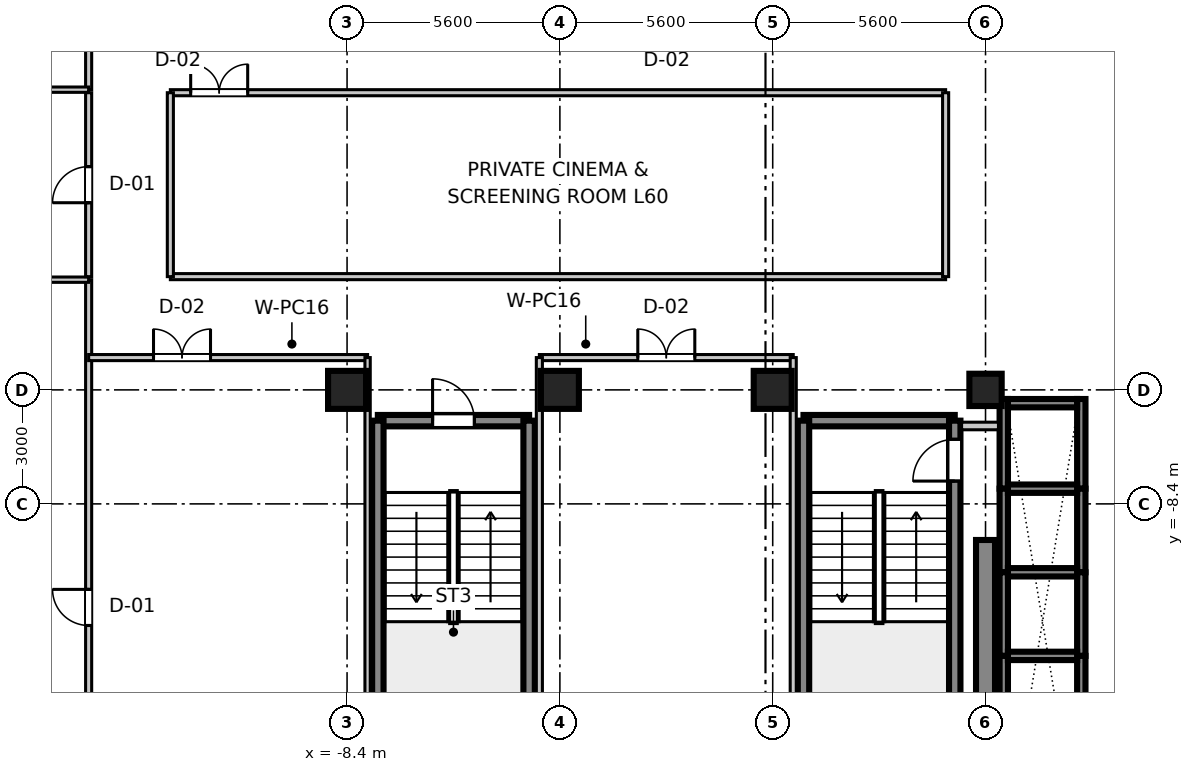
"""IFC4 building model, lengths in metres.
Left out: names, types, materials, properties, quantities, classifications, styles, units other than length and angle.
Written with IfcOpenShell. Run it as: python <this file> out.ifc"""

import sys

from ifc_helpers import new_model, si_unit, direction, frame, frame_2d, origin, origin_2d, place, context, subcontext, project, spatial, rectangle, extrude, source, transform, mapped, element, fill, save


model = new_model("IFC4")
c1 = context("Model", 3, precision=1e-05, world=origin(), true_north=direction((0.0, 1.0)))
c2 = subcontext(c1, "Body", "Model", "MODEL_VIEW")
j1 = project(units=[si_unit("LENGTHUNIT", "METRE"), si_unit("PLANEANGLEUNIT", "RADIAN")], contexts=[c1])
p1 = place(None, origin())
s1 = spatial("IfcSite", under=j1, at=p1, CompositionType="ELEMENT")
p2 = place(p1, origin())
s2 = spatial("IfcBuilding", under=s1, at=p2, CompositionType="ELEMENT")
p3 = place(p2, frame((0.0, 0.0, 234.5)))
s3 = spatial("IfcBuildingStorey", under=s2, at=p3, CompositionType="ELEMENT", Elevation=234.5)
m1 = source(origin(), c2, "Body", "SweptSolid", [
    extrude(rectangle(XDim=1.0, YDim=1.0, at=origin_2d()), origin(), (0.0, 0.0, 1.0), 3.655),
])
for number, where, z_axis, x_axis in (
    (1, (-8.4, -5.4, 0.0), (0.0, 0.0, 1.0), (1.0, 0.0, 0.0)),
    (2, (-2.8, -5.4, 0.0), (0.0, 0.0, 1.0), (1.0, 0.0, 0.0)),
    (3, (2.8, -5.4, 0.0), (0.0, 0.0, 1.0), (1.0, 0.0, 0.0)),
):
    element("IfcColumn", number, at=place(p3, frame(where, z_axis=z_axis, x_axis=x_axis)), inside=s3, PredefinedType="COLUMN", context=c2, shape_type="MappedRepresentation", body=[
        mapped(m1, transform((0.0, 0.0, 0.0), scale=1.0)),
    ])
m2 = source(origin(), c2, "Body", "SweptSolid", [
    extrude(rectangle(XDim=0.85, YDim=0.85, at=origin_2d()), origin(), (0.0, 0.0, 1.0), 3.655),
])
p4 = place(p3, frame((8.4, -5.4, 0.0), z_axis=(0.0, 0.0, 1.0), x_axis=(1.0, 0.0, 0.0)))
e4 = element("IfcColumn", 4, at=p4, inside=s3, PredefinedType="PILASTER", context=c2, shape_type="MappedRepresentation", body=[
    mapped(m2, transform((0.0, 0.0, 0.0), scale=1.0)),
])
m3 = source(origin(), c2, "Body", "SweptSolid", [
    extrude(rectangle(XDim=7.65, YDim=0.5, at=frame_2d((3.825, 0.0))), origin(), (0.0, 0.0, 1.0), 3.41),
])
p5 = place(p3, frame((8.4, -17.0, 0.0), z_axis=(0.0, 0.0, 1.0), x_axis=(0.0, 1.0, 0.0)))
e5 = element("IfcWall", 5, at=p5, inside=s3, PredefinedType="SHEAR", context=c2, shape_type="MappedRepresentation", body=[
    mapped(m3, transform((0.0, 0.0, 0.0), scale=1.0)),
])
m4 = source(origin(), c2, "Body", "SweptSolid", [
    extrude(rectangle(XDim=3.98, YDim=0.3, at=frame_2d((1.99, 0.0))), origin(), (0.0, 0.0, 1.0), 3.41),
])
p6 = place(p3, frame((3.61, -6.21, 0.0), z_axis=(0.0, 0.0, 1.0), x_axis=(1.0, 0.0, 0.0)))
e6 = element("IfcWall", 6, at=p6, inside=s3, PredefinedType="SHEAR", context=c2, shape_type="MappedRepresentation", body=[
    mapped(m4, transform((0.0, 0.0, 0.0), scale=1.0)),
])
m5 = source(origin(), c2, "Body", "SweptSolid", [
    extrude(rectangle(XDim=9.38, YDim=0.3, at=frame_2d((4.69, 0.0))), origin(), (0.0, 0.0, 1.0), 3.41),
])
p7 = place(p3, frame((3.61, -15.59, 0.0), z_axis=(0.0, 0.0, 1.0), x_axis=(0.0, 1.0, 0.0)))
e7 = element("IfcWall", 7, at=p7, inside=s3, PredefinedType="SHEAR", context=c2, shape_type="MappedRepresentation", body=[
    mapped(m5, transform((0.0, 0.0, 0.0), scale=1.0)),
])
p8 = place(p3, frame((7.59, -15.59, 0.0), z_axis=(0.0, 0.0, 1.0), x_axis=(0.0, 1.0, 0.0)))
e8 = element("IfcWall", 8, at=p8, inside=s3, PredefinedType="SHEAR", context=c2, shape_type="MappedRepresentation", body=[
    mapped(m5, transform((0.0, 0.0, 0.0), scale=1.0)),
])
p9 = place(p8, frame((7.79, 0.0, 0.0)))
e9 = element("IfcOpeningElement", 9, at=p9, cuts=e8, PredefinedType="OPENING", context=c2, shape_type="SweptSolid", body=[
    extrude(rectangle(XDim=1.1, YDim=2.15, at=frame_2d((0.55, 1.075))), frame((0.0, 0.16, 0.0), z_axis=(0.0, -1.0, 0.0), x_axis=(1.0, 0.0, 0.0)), (0.0, 0.0, 1.0), 0.32),
])
p10 = place(p3, frame((-7.59, -6.21, 0.0), z_axis=(0.0, 0.0, 1.0), x_axis=(1.0, 0.0, 0.0)))
e10 = element("IfcWall", 10, at=p10, inside=s3, PredefinedType="SHEAR", context=c2, shape_type="MappedRepresentation", body=[
    mapped(m4, transform((0.0, 0.0, 0.0), scale=1.0)),
])
p11 = place(p10, frame((1.44, 0.0, 0.0)))
e11 = element("IfcOpeningElement", 11, at=p11, cuts=e10, PredefinedType="OPENING", context=c2, shape_type="SweptSolid", body=[
    extrude(rectangle(XDim=1.1, YDim=2.15, at=frame_2d((0.55, 1.075))), frame((0.0, 0.16, 0.0), z_axis=(0.0, -1.0, 0.0), x_axis=(1.0, 0.0, 0.0)), (0.0, 0.0, 1.0), 0.32),
])
for number, where, z_axis, x_axis in (
    (12, (-7.59, -15.59, 0.0), (0.0, 0.0, 1.0), (0.0, 1.0, 0.0)),
    (13, (-3.61, -15.59, 0.0), (0.0, 0.0, 1.0), (0.0, 1.0, 0.0)),
):
    element("IfcWall", number, at=place(p3, frame(where, z_axis=z_axis, x_axis=x_axis)), inside=s3, PredefinedType="SHEAR", context=c2, shape_type="MappedRepresentation", body=[
        mapped(m5, transform((0.0, 0.0, 0.0), scale=1.0)),
    ])
m6 = source(origin(), c2, "Body", "SweptSolid", [
    extrude(rectangle(XDim=2.36, YDim=0.22, at=frame_2d((1.18, 0.0))), origin(), (0.0, 0.0, 1.0), 3.41),
])
for number, where, z_axis, x_axis in (
    (14, (8.88, -8.0, 0.0), (0.0, 0.0, 1.0), (0.0, 1.0, 0.0)),
    (15, (10.92, -8.0, 0.0), (0.0, 0.0, 1.0), (0.0, 1.0, 0.0)),
):
    element("IfcWall", number, at=place(p3, frame(where, z_axis=z_axis, x_axis=x_axis)), inside=s3, PredefinedType="SHEAR", context=c2, shape_type="MappedRepresentation", body=[
        mapped(m6, transform((0.0, 0.0, 0.0), scale=1.0)),
    ])
m7 = source(origin(), c2, "Body", "SweptSolid", [
    extrude(rectangle(XDim=1.82, YDim=0.22, at=frame_2d((0.91, 0.0))), origin(), (0.0, 0.0, 1.0), 3.41),
])
p12 = place(p3, frame((8.99, -5.75, 0.0), z_axis=(0.0, 0.0, 1.0), x_axis=(1.0, 0.0, 0.0)))
e16 = element("IfcWall", 16, at=p12, inside=s3, PredefinedType="SHEAR", context=c2, shape_type="MappedRepresentation", body=[
    mapped(m7, transform((0.0, 0.0, 0.0), scale=1.0)),
])
m8 = source(origin(), c2, "Body", "SweptSolid", [
    extrude(rectangle(XDim=2.2, YDim=0.22, at=frame_2d((1.1, 0.0))), origin(), (0.0, 0.0, 1.0), 3.41),
])
for number, where, z_axis, x_axis in (
    (17, (8.88, -10.2, 0.0), (0.0, 0.0, 1.0), (0.0, 1.0, 0.0)),
    (18, (10.92, -10.2, 0.0), (0.0, 0.0, 1.0), (0.0, 1.0, 0.0)),
):
    element("IfcWall", number, at=place(p3, frame(where, z_axis=z_axis, x_axis=x_axis)), inside=s3, PredefinedType="SHEAR", context=c2, shape_type="MappedRepresentation", body=[
        mapped(m8, transform((0.0, 0.0, 0.0), scale=1.0)),
    ])
m9 = source(origin(), c2, "Body", "SweptSolid", [
    extrude(rectangle(XDim=1.82, YDim=0.22, at=frame_2d((0.91, 0.0))), origin(), (0.0, 0.0, 1.0), 3.7),
])
p13 = place(p3, frame((8.99, -8.0, 0.0), z_axis=(0.0, 0.0, 1.0), x_axis=(1.0, 0.0, 0.0)))
e19 = element("IfcWall", 19, at=p13, inside=s3, PredefinedType="SHEAR", context=c2, shape_type="MappedRepresentation", body=[
    mapped(m9, transform((0.0, 0.0, 0.0), scale=1.0)),
])
for number, where, z_axis, x_axis in (
    (20, (8.88, -12.4, 0.0), (0.0, 0.0, 1.0), (0.0, 1.0, 0.0)),
    (21, (10.92, -12.4, 0.0), (0.0, 0.0, 1.0), (0.0, 1.0, 0.0)),
):
    element("IfcWall", number, at=place(p3, frame(where, z_axis=z_axis, x_axis=x_axis)), inside=s3, PredefinedType="SHEAR", context=c2, shape_type="MappedRepresentation", body=[
        mapped(m8, transform((0.0, 0.0, 0.0), scale=1.0)),
    ])
p14 = place(p3, frame((8.99, -10.2, 0.0), z_axis=(0.0, 0.0, 1.0), x_axis=(1.0, 0.0, 0.0)))
e22 = element("IfcWall", 22, at=p14, inside=s3, PredefinedType="SHEAR", context=c2, shape_type="MappedRepresentation", body=[
    mapped(m9, transform((0.0, 0.0, 0.0), scale=1.0)),
])
m10 = source(origin(), c2, "Body", "SweptSolid", [
    extrude(rectangle(XDim=2.325, YDim=0.22, at=frame_2d((1.163, 0.0))), origin(), (0.0, 0.0, 1.0), 3.41),
])
for number, where, z_axis, x_axis in (
    (23, (8.88, -14.725, 0.0), (0.0, 0.0, 1.0), (0.0, 1.0, 0.0)),
    (24, (10.92, -14.725, 0.0), (0.0, 0.0, 1.0), (0.0, 1.0, 0.0)),
):
    element("IfcWall", number, at=place(p3, frame(where, z_axis=z_axis, x_axis=x_axis)), inside=s3, PredefinedType="SHEAR", context=c2, shape_type="MappedRepresentation", body=[
        mapped(m10, transform((0.0, 0.0, 0.0), scale=1.0)),
    ])
p15 = place(p3, frame((8.99, -12.4, 0.0), z_axis=(0.0, 0.0, 1.0), x_axis=(1.0, 0.0, 0.0)))
e25 = element("IfcWall", 25, at=p15, inside=s3, PredefinedType="SHEAR", context=c2, shape_type="MappedRepresentation", body=[
    mapped(m9, transform((0.0, 0.0, 0.0), scale=1.0)),
])
m11 = source(origin(), c2, "Body", "SweptSolid", [
    extrude(rectangle(XDim=0.97, YDim=0.2, at=frame_2d((0.485, 0.0))), origin(), (0.0, 0.0, 1.0), 2.75),
])
p16 = place(p3, frame((7.77, -6.35, 0.0), z_axis=(0.0, 0.0, 1.0), x_axis=(1.0, 0.0, 0.0)))
e26 = element("IfcWall", 26, at=p16, inside=s3, PredefinedType="PARTITIONING", context=c2, shape_type="MappedRepresentation", body=[
    mapped(m11, transform((0.0, 0.0, 0.0), scale=1.0)),
])
m12 = source(origin(), c2, "Body", "SweptSolid", [
    extrude(rectangle(XDim=21.4, YDim=0.16, at=frame_2d((10.7, 0.0))), origin(), (0.0, 0.0, 1.0), 2.75),
])
p17 = place(p3, frame((-15.2, 2.5, 0.0), z_axis=(0.0, 0.0, 1.0), x_axis=(0.0, 1.0, 0.0)))
e27 = element("IfcWall", 27, at=p17, inside=s3, PredefinedType="PARTITIONING", context=c2, shape_type="MappedRepresentation", body=[
    mapped(m12, transform((0.0, 0.0, 0.0), scale=1.0)),
])
p18 = place(p17, frame((8.15, 0.0, 0.0)))
e28 = element("IfcOpeningElement", 28, at=p18, cuts=e27, PredefinedType="OPENING", context=c2, shape_type="SweptSolid", body=[
    extrude(rectangle(XDim=0.95, YDim=2.1, at=frame_2d((0.475, 1.05))), frame((0.0, 0.09, 0.0), z_axis=(0.0, -1.0, 0.0), x_axis=(1.0, 0.0, 0.0)), (0.0, 0.0, 1.0), 0.18),
])
m13 = source(origin(), c2, "Body", "SweptSolid", [
    extrude(rectangle(XDim=5.96, YDim=0.14, at=frame_2d((2.98, 0.0))), origin(), (0.0, 0.0, 1.0), 2.75),
])
p19 = place(p3, frame((-21.16, 2.5, 0.0), z_axis=(0.0, 0.0, 1.0), x_axis=(1.0, 0.0, 0.0)))
e29 = element("IfcWall", 29, at=p19, inside=s3, PredefinedType="PARTITIONING", context=c2, shape_type="MappedRepresentation", body=[
    mapped(m13, transform((0.0, 0.0, 0.0), scale=1.0)),
])
p20 = place(p3, frame((-15.2, -23.9, 0.0), z_axis=(0.0, 0.0, 1.0), x_axis=(0.0, 1.0, 0.0)))
e30 = element("IfcWall", 30, at=p20, inside=s3, PredefinedType="PARTITIONING", context=c2, shape_type="MappedRepresentation", body=[
    mapped(m12, transform((0.0, 0.0, 0.0), scale=1.0)),
])
p21 = place(p20, frame((12.3, 0.0, 0.0)))
e31 = element("IfcOpeningElement", 31, at=p21, cuts=e30, PredefinedType="OPENING", context=c2, shape_type="SweptSolid", body=[
    extrude(rectangle(XDim=0.95, YDim=2.1, at=frame_2d((0.475, 1.05))), frame((0.0, 0.09, 0.0), z_axis=(0.0, -1.0, 0.0), x_axis=(1.0, 0.0, 0.0)), (0.0, 0.0, 1.0), 0.18),
])
p22 = place(p3, frame((-21.16, -2.5, 0.0), z_axis=(0.0, 0.0, 1.0), x_axis=(1.0, 0.0, 0.0)))
e32 = element("IfcWall", 32, at=p22, inside=s3, PredefinedType="PARTITIONING", context=c2, shape_type="MappedRepresentation", body=[
    mapped(m13, transform((0.0, 0.0, 0.0), scale=1.0)),
])
m14 = source(origin(), c2, "Body", "SweptSolid", [
    extrude(rectangle(XDim=7.34, YDim=0.16, at=frame_2d((3.67, 0.0))), origin(), (0.0, 0.0, 1.0), 2.75),
])
p23 = place(p3, frame((-15.2, -4.55, 0.0), z_axis=(0.0, 0.0, 1.0), x_axis=(1.0, 0.0, 0.0)))
e33 = element("IfcWall", 33, at=p23, inside=s3, PredefinedType="PARTITIONING", context=c2, shape_type="MappedRepresentation", body=[
    mapped(m14, transform((0.0, 0.0, 0.0), scale=1.0)),
])
p24 = place(p23, frame((1.707, 0.0, 0.0)))
e34 = element("IfcOpeningElement", 34, at=p24, cuts=e33, PredefinedType="OPENING", context=c2, shape_type="SweptSolid", body=[
    extrude(rectangle(XDim=1.5, YDim=2.15, at=frame_2d((0.75, 1.075))), frame((0.0, 0.09, 0.0), z_axis=(0.0, -1.0, 0.0), x_axis=(1.0, 0.0, 0.0)), (0.0, 0.0, 1.0), 0.18),
])
m15 = source(origin(), c2, "Body", "SweptSolid", [
    extrude(rectangle(XDim=19.35, YDim=0.14, at=frame_2d((9.675, 0.0))), origin(), (0.0, 0.0, 1.0), 2.75),
])
p25 = place(p3, frame((-7.86, -23.9, 0.0), z_axis=(0.0, 0.0, 1.0), x_axis=(0.0, 1.0, 0.0)))
e35 = element("IfcWall", 35, at=p25, inside=s3, PredefinedType="PARTITIONING", context=c2, shape_type="MappedRepresentation", body=[
    mapped(m15, transform((0.0, 0.0, 0.0), scale=1.0)),
])
m16 = source(origin(), c2, "Body", "SweptSolid", [
    extrude(rectangle(XDim=6.68, YDim=0.16, at=frame_2d((3.34, 0.0))), origin(), (0.0, 0.0, 1.0), 2.75),
])
p26 = place(p3, frame((-3.34, -4.55, 0.0), z_axis=(0.0, 0.0, 1.0), x_axis=(1.0, 0.0, 0.0)))
e36 = element("IfcWall", 36, at=p26, inside=s3, PredefinedType="PARTITIONING", context=c2, shape_type="MappedRepresentation", body=[
    mapped(m16, transform((0.0, 0.0, 0.0), scale=1.0)),
])
p27 = place(p26, frame((2.59, 0.0, 0.0)))
e37 = element("IfcOpeningElement", 37, at=p27, cuts=e36, PredefinedType="OPENING", context=c2, shape_type="SweptSolid", body=[
    extrude(rectangle(XDim=1.5, YDim=2.15, at=frame_2d((0.75, 1.075))), frame((0.0, 0.09, 0.0), z_axis=(0.0, -1.0, 0.0), x_axis=(1.0, 0.0, 0.0)), (0.0, 0.0, 1.0), 0.18),
])
m17 = source(origin(), c2, "Body", "SweptSolid", [
    extrude(rectangle(XDim=19.35, YDim=0.16, at=frame_2d((9.675, 0.0))), origin(), (0.0, 0.0, 1.0), 2.75),
])
for number, where, z_axis, x_axis in (
    (38, (-3.34, -23.9, 0.0), (0.0, 0.0, 1.0), (0.0, 1.0, 0.0)),
    (39, (3.34, -23.9, 0.0), (0.0, 0.0, 1.0), (0.0, 1.0, 0.0)),
):
    element("IfcWall", number, at=place(p3, frame(where, z_axis=z_axis, x_axis=x_axis)), inside=s3, PredefinedType="PARTITIONING", context=c2, shape_type="MappedRepresentation", body=[
        mapped(m17, transform((0.0, 0.0, 0.0), scale=1.0)),
    ])
m18 = source(origin(), c2, "Body", "SweptSolid", [
    extrude(rectangle(XDim=4.84, YDim=0.16, at=frame_2d((2.42, 0.0))), origin(), (0.0, 0.0, 1.0), 2.75),
])
p28 = place(p3, frame((-15.2, -2.42, 0.0), z_axis=(0.0, 0.0, 1.0), x_axis=(0.0, 1.0, 0.0)))
e40 = element("IfcWall", 40, at=p28, inside=s3, PredefinedType="PARTITIONING", context=c2, shape_type="MappedRepresentation", body=[
    mapped(m18, transform((0.0, 0.0, 0.0), scale=1.0)),
])
p29 = place(p28, frame((1.945, 0.0, 0.0)))
e41 = element("IfcOpeningElement", 41, at=p29, cuts=e40, PredefinedType="OPENING", context=c2, shape_type="SweptSolid", body=[
    extrude(rectangle(XDim=0.95, YDim=2.1, at=frame_2d((0.475, 1.05))), frame((0.0, 0.09, 0.0), z_axis=(0.0, -1.0, 0.0), x_axis=(1.0, 0.0, 0.0)), (0.0, 0.0, 1.0), 0.18),
])
m19 = source(origin(), c2, "Body", "SweptSolid", [
    extrude(rectangle(XDim=20.4, YDim=0.16, at=frame_2d((10.2, 0.0))), origin(), (0.0, 0.0, 1.0), 2.75),
])
p30 = place(p3, frame((-13.05, -2.42, 0.0), z_axis=(0.0, 0.0, 1.0), x_axis=(1.0, 0.0, 0.0)))
e42 = element("IfcWall", 42, at=p30, inside=s3, PredefinedType="PARTITIONING", context=c2, shape_type="MappedRepresentation", body=[
    mapped(m19, transform((0.0, 0.0, 0.0), scale=1.0)),
])
p31 = place(p3, frame((-13.05, 2.42, 0.0), z_axis=(0.0, 0.0, 1.0), x_axis=(1.0, 0.0, 0.0)))
e43 = element("IfcWall", 43, at=p31, inside=s3, PredefinedType="PARTITIONING", context=c2, shape_type="MappedRepresentation", body=[
    mapped(m19, transform((0.0, 0.0, 0.0), scale=1.0)),
])
p32 = place(p31, frame((0.535, 0.0, 0.0)))
e44 = element("IfcOpeningElement", 44, at=p32, cuts=e43, PredefinedType="OPENING", context=c2, shape_type="SweptSolid", body=[
    extrude(rectangle(XDim=1.5, YDim=2.15, at=frame_2d((0.75, 1.075))), frame((0.0, 0.09, 0.0), z_axis=(0.0, -1.0, 0.0), x_axis=(1.0, 0.0, 0.0)), (0.0, 0.0, 1.0), 0.18),
])
for number, where, z_axis, x_axis in (
    (45, (-13.05, -2.42, 0.0), (0.0, 0.0, 1.0), (0.0, 1.0, 0.0)),
    (46, (7.35, -2.42, 0.0), (0.0, 0.0, 1.0), (0.0, 1.0, 0.0)),
):
    element("IfcWall", number, at=place(p3, frame(where, z_axis=z_axis, x_axis=x_axis)), inside=s3, PredefinedType="PARTITIONING", context=c2, shape_type="MappedRepresentation", body=[
        mapped(m18, transform((0.0, 0.0, 0.0), scale=1.0)),
    ])
m20 = source(origin(), c2, "Body", "SweptSolid", [
    extrude(rectangle(XDim=1.1, YDim=2.15, at=frame_2d((0.55, 1.075))), frame((0.0, 0.025, 0.0), z_axis=(0.0, -1.0, 0.0), x_axis=(1.0, 0.0, 0.0)), (0.0, 0.0, 1.0), 0.05),
])
p33 = place(p9, origin())
e47 = element("IfcDoor", 47, at=p33, inside=s3, OperationType="SINGLE_SWING_LEFT", PredefinedType="DOOR", context=c2, shape_type="MappedRepresentation", body=[
    mapped(m20, transform((0.0, 0.0, 0.0), scale=1.0)),
])
fill(e9, e47)
p34 = place(p11, frame((1.1, 0.0, 0.0), z_axis=(0.0, 0.0, 1.0), x_axis=(-1.0, 0.0, 0.0)))
e48 = element("IfcDoor", 48, at=p34, inside=s3, OperationType="SINGLE_SWING_LEFT", PredefinedType="DOOR", context=c2, shape_type="MappedRepresentation", body=[
    mapped(m20, transform((0.0, 0.0, 0.0), scale=1.0)),
])
fill(e11, e48)
m21 = source(origin(), c2, "Body", "SweptSolid", [
    extrude(rectangle(XDim=0.95, YDim=2.1, at=frame_2d((0.475, 1.05))), frame((0.0, 0.025, 0.0), z_axis=(0.0, -1.0, 0.0), x_axis=(1.0, 0.0, 0.0)), (0.0, 0.0, 1.0), 0.05),
])
p35 = place(p21, origin())
e49 = element("IfcDoor", 49, at=p35, inside=s3, OperationType="SINGLE_SWING_RIGHT", PredefinedType="DOOR", context=c2, shape_type="MappedRepresentation", body=[
    mapped(m21, transform((0.0, 0.0, 0.0), scale=1.0)),
])
fill(e31, e49)
m22 = source(origin(), c2, "Body", "SweptSolid", [
    extrude(rectangle(XDim=1.5, YDim=2.15, at=frame_2d((0.75, 1.075))), frame((0.0, 0.025, 0.0), z_axis=(0.0, -1.0, 0.0), x_axis=(1.0, 0.0, 0.0)), (0.0, 0.0, 1.0), 0.05),
])
p36 = place(p24, frame((1.5, 0.0, 0.0), z_axis=(0.0, 0.0, 1.0), x_axis=(-1.0, 0.0, 0.0)))
e50 = element("IfcDoor", 50, at=p36, inside=s3, OperationType="DOUBLE_DOOR_SINGLE_SWING", PredefinedType="DOOR", context=c2, shape_type="MappedRepresentation", body=[
    mapped(m22, transform((0.0, 0.0, 0.0), scale=1.0)),
])
fill(e34, e50)
p37 = place(p27, frame((1.5, 0.0, 0.0), z_axis=(0.0, 0.0, 1.0), x_axis=(-1.0, 0.0, 0.0)))
e51 = element("IfcDoor", 51, at=p37, inside=s3, OperationType="DOUBLE_DOOR_SINGLE_SWING", PredefinedType="DOOR", context=c2, shape_type="MappedRepresentation", body=[
    mapped(m22, transform((0.0, 0.0, 0.0), scale=1.0)),
])
fill(e37, e51)
p38 = place(p29, origin())
e52 = element("IfcDoor", 52, at=p38, inside=s3, OperationType="SINGLE_SWING_LEFT", PredefinedType="DOOR", context=c2, shape_type="MappedRepresentation", body=[
    mapped(m21, transform((0.0, 0.0, 0.0), scale=1.0)),
])
fill(e41, e52)
p39 = place(p32, frame((1.5, 0.0, 0.0), z_axis=(0.0, 0.0, 1.0), x_axis=(-1.0, 0.0, 0.0)))
e53 = element("IfcDoor", 53, at=p39, inside=s3, OperationType="DOUBLE_DOOR_SINGLE_SWING", PredefinedType="DOOR", context=c2, shape_type="MappedRepresentation", body=[
    mapped(m22, transform((0.0, 0.0, 0.0), scale=1.0)),
])
fill(e44, e53)
save(model, sys.argv[1])
